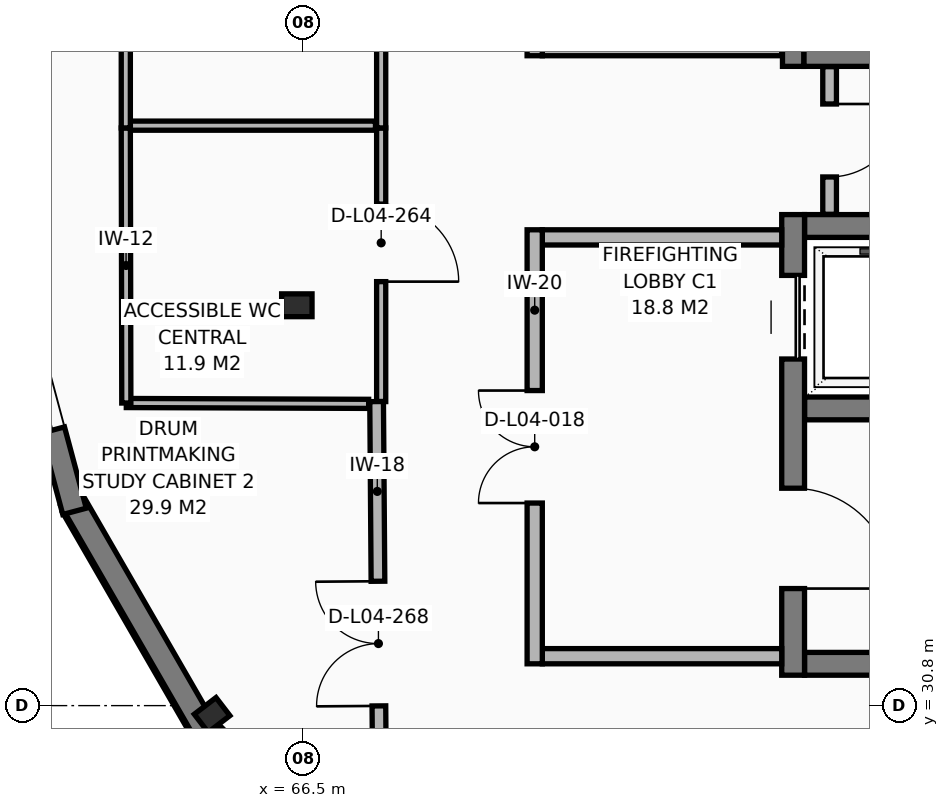
"""IFC4 building model, lengths in metres.
Left out: names, types, materials, properties, quantities, classifications, styles, units other than length and angle.
Written with IfcOpenShell. Run it as: python <this file> out.ifc"""

import sys

from ifc_helpers import new_model, si_unit, direction, frame, frame_2d, origin, origin_2d, place, context, subcontext, project, spatial, rectangle, i_section, extrude, element, fill, save


model = new_model("IFC4")
c1 = context("Model", 3, precision=1e-05, world=origin(), true_north=direction((0.0, 1.0)))
c2 = subcontext(c1, "Body", "Model", "MODEL_VIEW")
j1 = project(units=[si_unit("LENGTHUNIT", "METRE"), si_unit("PLANEANGLEUNIT", "RADIAN")], contexts=[c1])
p1 = place(None, origin())
s1 = spatial("IfcSite", under=j1, at=p1, CompositionType="ELEMENT")
p2 = place(p1, origin())
s2 = spatial("IfcBuilding", under=s1, at=p2, CompositionType="ELEMENT")
p3 = place(p2, frame((0.0, 0.0, 17.64)))
s3 = spatial("IfcBuildingStorey", under=s2, at=p3, CompositionType="ELEMENT", Elevation=17.64)
p4 = place(p3, frame((65.305, 30.677, 0.0), z_axis=(0.0, 0.0, 1.0), x_axis=(-0.793353340291, -0.608761429009, 0.0)))
e1 = element("IfcColumn", 1, at=p4, inside=s3, PredefinedType="COLUMN", context=c2, shape_type="SweptSolid", body=[
    extrude(i_section(OverallWidth=0.3, OverallDepth=0.36, WebThickness=0.012, FlangeThickness=0.022, FilletRadius=0.027, at=origin_2d()), origin(), (0.0, 0.0, 1.0), 3.96),
])
p5 = place(p3, frame((66.42, 36.067, 0.0), z_axis=(0.0, 0.0, 1.0), x_axis=(1.0, 0.0, 0.0)))
e2 = element("IfcColumn", 2, at=p5, inside=s3, PredefinedType="COLUMN", context=c2, shape_type="SweptSolid", body=[
    extrude(i_section(OverallWidth=0.3, OverallDepth=0.4, WebThickness=0.013, FlangeThickness=0.024, FilletRadius=0.027, at=origin_2d()), origin(), (0.0, 0.0, 1.0), 3.96),
])
p6 = place(p3, frame((67.676, 28.042, 0.0), z_axis=(0.0, 0.0, 1.0), x_axis=(-0.707072526286, 0.707141034428, 0.0)))
e3 = element("IfcWall", 3, at=p6, inside=s3, PredefinedType="SOLIDWALL", context=c2, shape_type="SweptSolid", body=[
    extrude(rectangle(XDim=3.564, YDim=0.32, at=frame_2d((1.782, 0.0))), origin(), (0.0, 0.0, 1.0), 3.74),
])
p7 = place(p6, frame((1.107, 0.0, 0.85)))
e4 = element("IfcOpeningElement", 4, at=p7, cuts=e3, PredefinedType="OPENING", context=c2, shape_type="SweptSolid", body=[
    extrude(rectangle(XDim=1.35, YDim=1.5, at=frame_2d((0.675, 0.75))), frame((0.0, 0.17, 0.0), z_axis=(0.0, -1.0, 0.0), x_axis=(1.0, 0.0, 0.0)), (0.0, 0.0, 1.0), 0.34),
])
p8 = place(p3, frame((65.236, 30.424, 0.0), z_axis=(0.0, 0.0, 1.0), x_axis=(-0.499926044331, 0.8660680979, 0.0)))
e5 = element("IfcWall", 5, at=p8, inside=s3, PredefinedType="SOLIDWALL", context=c2, shape_type="SweptSolid", body=[
    extrude(rectangle(XDim=3.564, YDim=0.32, at=frame_2d((1.782, 0.0))), origin(), (0.0, 0.0, 1.0), 3.74),
])
p9 = place(p3, frame((63.495, 33.356, 0.0), z_axis=(0.0, 0.0, 1.0), x_axis=(-0.258830827966, 0.965922669003, 0.0)))
e6 = element("IfcWall", 6, at=p9, inside=s3, PredefinedType="SOLIDWALL", context=c2, shape_type="SweptSolid", body=[
    extrude(rectangle(XDim=3.563, YDim=0.32, at=frame_2d((1.782, 0.0))), origin(), (0.0, 0.0, 1.0), 3.74),
])
p10 = place(p9, frame((1.107, 0.0, 0.85)))
e7 = element("IfcOpeningElement", 7, at=p10, cuts=e6, PredefinedType="OPENING", context=c2, shape_type="SweptSolid", body=[
    extrude(rectangle(XDim=1.35, YDim=1.5, at=frame_2d((0.675, 0.75))), frame((0.0, 0.17, 0.0), z_axis=(0.0, -1.0, 0.0), x_axis=(1.0, 0.0, 0.0)), (0.0, 0.0, 1.0), 0.34),
])
for number, where, z_axis, x_axis in (
    (8, (73.1, 31.35, 0.0), (0.0, 0.0, 1.0), (1.0, 0.0, 0.0)),
    (9, (80.8, 34.71, 0.0), (0.0, 0.0, 1.0), (-1.0, 0.0, 0.0)),
):
    element("IfcWall", number, at=place(p3, frame(where, z_axis=z_axis, x_axis=x_axis)), inside=s3, PredefinedType="SHEAR", context=c2, shape_type="SweptSolid", body=[
        extrude(rectangle(XDim=7.7, YDim=0.3, at=frame_2d((3.85, 0.0))), origin(), (0.0, 0.0, 1.0), 3.74),
    ])
p11 = place(p3, frame((76.3, 37.11, 0.0), z_axis=(0.0, 0.0, 1.0), x_axis=(-1.0, 0.0, 0.0)))
e10 = element("IfcWall", 10, at=p11, inside=s3, PredefinedType="SHEAR", context=c2, shape_type="SweptSolid", body=[
    extrude(rectangle(XDim=3.2, YDim=0.3, at=frame_2d((1.6, 0.0))), origin(), (0.0, 0.0, 1.0), 3.74),
])
p12 = place(p3, frame((72.95, 37.26, 0.0), z_axis=(0.0, 0.0, 1.0), x_axis=(0.0, -1.0, 0.0)))
e11 = element("IfcWall", 11, at=p12, inside=s3, PredefinedType="SHEAR", context=c2, shape_type="SweptSolid", body=[
    extrude(rectangle(XDim=6.06, YDim=0.3, at=frame_2d((3.03, 0.0))), origin(), (0.0, 0.0, 1.0), 3.74),
])
p13 = place(p12, frame((0.8, 0.0, 0.0)))
e12 = element("IfcOpeningElement", 12, at=p13, cuts=e11, PredefinedType="OPENING", context=c2, shape_type="SweptSolid", body=[
    extrude(rectangle(XDim=1.1, YDim=2.12, at=frame_2d((0.55, 1.06))), frame((0.0, 0.16, 0.0), z_axis=(0.0, -1.0, 0.0), x_axis=(1.0, 0.0, 0.0)), (0.0, 0.0, 1.0), 0.32),
])
p14 = place(p12, frame((3.6, 0.0, 0.0)))
e13 = element("IfcOpeningElement", 13, at=p14, cuts=e11, PredefinedType="OPENING", context=c2, shape_type="SweptSolid", body=[
    extrude(rectangle(XDim=1.32, YDim=2.12, at=frame_2d((0.66, 1.06))), frame((0.0, 0.16, 0.0), z_axis=(0.0, -1.0, 0.0), x_axis=(1.0, 0.0, 0.0)), (0.0, 0.0, 1.0), 0.32),
])
p15 = place(p3, frame((69.65, 31.45, 0.0), z_axis=(0.0, 0.0, 1.0), x_axis=(1.0, 0.0, 0.0)))
e14 = element("IfcWall", 14, at=p15, inside=s3, PredefinedType="PARTITIONING", context=c2, shape_type="SweptSolid", body=[
    extrude(rectangle(XDim=3.15, YDim=0.2, at=frame_2d((1.575, 0.0))), origin(), (0.0, 0.0, 1.0), 3.13),
])
p16 = place(p3, frame((72.8, 36.96, 0.0), z_axis=(0.0, 0.0, 1.0), x_axis=(-1.0, 0.0, 0.0)))
e15 = element("IfcWall", 15, at=p16, inside=s3, PredefinedType="PARTITIONING", context=c2, shape_type="SweptSolid", body=[
    extrude(rectangle(XDim=3.15, YDim=0.2, at=frame_2d((1.575, 0.0))), origin(), (0.0, 0.0, 1.0), 3.74),
])
p17 = place(p3, frame((69.55, 31.35, 0.0), z_axis=(0.0, 0.0, 1.0), x_axis=(0.0, 1.0, 0.0)))
e16 = element("IfcWall", 16, at=p17, inside=s3, PredefinedType="PARTITIONING", context=c2, shape_type="SweptSolid", body=[
    extrude(rectangle(XDim=5.71, YDim=0.2, at=frame_2d((2.855, 0.0))), origin(), (0.0, 0.0, 1.0), 3.13),
])
p18 = place(p17, frame((2.115, 0.0, 0.0)))
e17 = element("IfcOpeningElement", 17, at=p18, cuts=e16, PredefinedType="OPENING", context=c2, shape_type="SweptSolid", body=[
    extrude(rectangle(XDim=1.48, YDim=2.15, at=frame_2d((0.74, 1.075))), frame((0.0, 0.11, 0.0), z_axis=(0.0, -1.0, 0.0), x_axis=(1.0, 0.0, 0.0)), (0.0, 0.0, 1.0), 0.22),
])
p19 = place(p3, frame((73.09, 39.35, 0.0), z_axis=(0.0, 0.0, 1.0), x_axis=(1.0, 0.0, 0.0)))
e18 = element("IfcWall", 18, at=p19, inside=s3, PredefinedType="SHEAR", context=c2, shape_type="SweptSolid", body=[
    extrude(rectangle(XDim=7.7, YDim=0.28, at=frame_2d((3.85, 0.0))), origin(), (0.0, 0.0, 1.0), 3.74),
])
p20 = place(p3, frame((72.95, 45.25, 0.0), z_axis=(0.0, 0.0, 1.0), x_axis=(0.0, -1.0, 0.0)))
e19 = element("IfcWall", 19, at=p20, inside=s3, PredefinedType="SHEAR", context=c2, shape_type="SweptSolid", body=[
    extrude(rectangle(XDim=6.04, YDim=0.28, at=frame_2d((3.02, 0.0))), origin(), (0.0, 0.0, 1.0), 3.74),
])
p21 = place(p20, frame((0.8, 0.0, 0.0)))
e20 = element("IfcOpeningElement", 20, at=p21, cuts=e19, PredefinedType="OPENING", context=c2, shape_type="SweptSolid", body=[
    extrude(rectangle(XDim=1.1, YDim=2.12, at=frame_2d((0.55, 1.06))), frame((0.0, 0.15, 0.0), z_axis=(0.0, -1.0, 0.0), x_axis=(1.0, 0.0, 0.0)), (0.0, 0.0, 1.0), 0.3),
])
p22 = place(p20, frame((3.6, 0.0, 0.0)))
e21 = element("IfcOpeningElement", 21, at=p22, cuts=e19, PredefinedType="OPENING", context=c2, shape_type="SweptSolid", body=[
    extrude(rectangle(XDim=1.32, YDim=2.12, at=frame_2d((0.66, 1.06))), frame((0.0, 0.15, 0.0), z_axis=(0.0, -1.0, 0.0), x_axis=(1.0, 0.0, 0.0)), (0.0, 0.0, 1.0), 0.3),
])
p23 = place(p3, frame((69.65, 39.45, 0.0), z_axis=(0.0, 0.0, 1.0), x_axis=(1.0, 0.0, 0.0)))
e22 = element("IfcWall", 22, at=p23, inside=s3, PredefinedType="PARTITIONING", context=c2, shape_type="SweptSolid", body=[
    extrude(rectangle(XDim=3.15, YDim=0.2, at=frame_2d((1.575, 0.0))), origin(), (0.0, 0.0, 1.0), 3.74),
])
p24 = place(p3, frame((69.55, 39.35, 0.0), z_axis=(0.0, 0.0, 1.0), x_axis=(0.0, 1.0, 0.0)))
e23 = element("IfcWall", 23, at=p24, inside=s3, PredefinedType="PARTITIONING", context=c2, shape_type="SweptSolid", body=[
    extrude(rectangle(XDim=5.71, YDim=0.2, at=frame_2d((2.855, 0.0))), origin(), (0.0, 0.0, 1.0), 3.13),
])
p25 = place(p24, frame((2.115, 0.0, 0.0)))
e24 = element("IfcOpeningElement", 24, at=p25, cuts=e23, PredefinedType="OPENING", context=c2, shape_type="SweptSolid", body=[
    extrude(rectangle(XDim=1.48, YDim=2.15, at=frame_2d((0.74, 1.075))), frame((0.0, 0.11, 0.0), z_axis=(0.0, -1.0, 0.0), x_axis=(1.0, 0.0, 0.0)), (0.0, 0.0, 1.0), 0.22),
])
p26 = place(p3, frame((67.53, 38.4, 0.0), z_axis=(0.0, 0.0, 1.0), x_axis=(0.0, -1.0, 0.0)))
e25 = element("IfcWall", 25, at=p26, inside=s3, PredefinedType="PARTITIONING", context=c2, shape_type="SweptSolid", body=[
    extrude(rectangle(XDim=3.6, YDim=0.12, at=frame_2d((1.8, 0.0))), origin(), (0.0, 0.0, 1.0), 3.13),
])
p27 = place(p26, frame((1.002, 0.0, 0.0)))
e26 = element("IfcOpeningElement", 26, at=p27, cuts=e25, PredefinedType="OPENING", context=c2, shape_type="SweptSolid", body=[
    extrude(rectangle(XDim=1.02, YDim=2.12, at=frame_2d((0.51, 1.06))), frame((0.0, 0.07, 0.0), z_axis=(0.0, -1.0, 0.0), x_axis=(1.0, 0.0, 0.0)), (0.0, 0.0, 1.0), 0.14),
])
p28 = place(p3, frame((67.53, 42.0, 0.0), z_axis=(0.0, 0.0, 1.0), x_axis=(0.0, -1.0, 0.0)))
e27 = element("IfcWall", 27, at=p28, inside=s3, PredefinedType="PARTITIONING", context=c2, shape_type="SweptSolid", body=[
    extrude(rectangle(XDim=3.6, YDim=0.12, at=frame_2d((1.8, 0.0))), origin(), (0.0, 0.0, 1.0), 3.13),
])
p29 = place(p28, frame((1.32, 0.0, 0.0)))
e28 = element("IfcOpeningElement", 28, at=p29, cuts=e27, PredefinedType="OPENING", context=c2, shape_type="SweptSolid", body=[
    extrude(rectangle(XDim=0.96, YDim=2.1, at=frame_2d((0.48, 1.05))), frame((0.0, 0.07, 0.0), z_axis=(0.0, -1.0, 0.0), x_axis=(1.0, 0.0, 0.0)), (0.0, 0.0, 1.0), 0.14),
])
p30 = place(p3, frame((73.43, 39.206, 0.0), z_axis=(0.0, 0.0, 1.0), x_axis=(0.0, -1.0, 0.0)))
e29 = element("IfcWall", 29, at=p30, inside=s3, PredefinedType="PARTITIONING", context=c2, shape_type="SweptSolid", body=[
    extrude(rectangle(XDim=1.942, YDim=0.18, at=frame_2d((0.971, 0.0))), origin(), (0.0, 0.0, 1.0), 3.73),
])
p31 = place(p30, frame((0.491, 0.0, 0.0)))
e30 = element("IfcOpeningElement", 30, at=p31, cuts=e29, PredefinedType="OPENING", context=c2, shape_type="SweptSolid", body=[
    extrude(rectangle(XDim=0.96, YDim=2.1, at=frame_2d((0.48, 1.05))), frame((0.0, 0.1, 0.0), z_axis=(0.0, -1.0, 0.0), x_axis=(1.0, 0.0, 0.0)), (0.0, 0.0, 1.0), 0.2),
])
p32 = place(p3, frame((67.518, 28.433, 0.0), z_axis=(0.0, 0.0, 1.0), x_axis=(-0.007476498212, 0.999972050597, 0.0)))
e31 = element("IfcWall", 31, at=p32, inside=s3, PredefinedType="PARTITIONING", context=c2, shape_type="SweptSolid", body=[
    extrude(rectangle(XDim=6.368, YDim=0.18, at=frame_2d((3.184, 0.0))), origin(), (0.0, 0.0, 1.0), 3.13),
])
p33 = place(p32, frame((2.364, 0.0, 0.0)))
e32 = element("IfcOpeningElement", 32, at=p33, cuts=e31, PredefinedType="OPENING", context=c2, shape_type="SweptSolid", body=[
    extrude(rectangle(XDim=1.64, YDim=2.2, at=frame_2d((0.82, 1.1))), frame((0.0, 0.1, 0.0), z_axis=(0.0, -1.0, 0.0), x_axis=(1.0, 0.0, 0.0)), (0.0, 0.0, 1.0), 0.2),
])
p34 = place(p3, frame((64.2, 38.43, 0.0), z_axis=(0.0, 0.0, 1.0), x_axis=(1.0, 0.0, 0.0)))
e33 = element("IfcWall", 33, at=p34, inside=s3, PredefinedType="PARTITIONING", context=c2, shape_type="SweptSolid", body=[
    extrude(rectangle(XDim=3.255, YDim=0.12, at=frame_2d((1.627, 0.0))), origin(), (0.0, 0.0, 1.0), 3.13),
])
p35 = place(p3, frame((67.365, 34.77, 0.0), z_axis=(0.0, 0.0, 1.0), x_axis=(-0.999994063851, 0.003445615075, 0.0)))
e34 = element("IfcWall", 34, at=p35, inside=s3, PredefinedType="PARTITIONING", context=c2, shape_type="SweptSolid", body=[
    extrude(rectangle(XDim=3.188, YDim=0.12, at=frame_2d((1.594, 0.0))), origin(), (0.0, 0.0, 1.0), 3.13),
])
p36 = place(p3, frame((64.177, 34.781, 0.0), z_axis=(0.0, 0.0, 1.0), x_axis=(-0.001888952982, 0.999998215927, 0.0)))
e35 = element("IfcWall", 35, at=p36, inside=s3, PredefinedType="PARTITIONING", context=c2, shape_type="SweptSolid", body=[
    extrude(rectangle(XDim=3.619, YDim=0.12, at=frame_2d((1.81, 0.0))), origin(), (0.0, 0.0, 1.0), 3.28),
])
p37 = place(p3, frame((64.17, 38.4, 0.0), z_axis=(0.0, 0.0, 1.0), x_axis=(0.0, 1.0, 0.0)))
e36 = element("IfcWall", 36, at=p37, inside=s3, PredefinedType="PARTITIONING", context=c2, shape_type="SweptSolid", body=[
    extrude(rectangle(XDim=3.6, YDim=0.12, at=frame_2d((1.8, 0.0))), origin(), (0.0, 0.0, 1.0), 3.73),
])
p38 = place(p10, origin())
e37 = element("IfcWindow", 37, at=p38, inside=s3, PartitioningType="SINGLE_PANEL", PredefinedType="WINDOW", context=c2, shape_type="SweptSolid", body=[
    extrude(rectangle(XDim=1.35, YDim=1.5, at=frame_2d((0.675, 0.75))), frame((0.0, 0.03, 0.0), z_axis=(0.0, -1.0, 0.0), x_axis=(1.0, 0.0, 0.0)), (0.0, 0.0, 1.0), 0.06),
])
fill(e7, e37)
p39 = place(p13, origin())
e38 = element("IfcDoor", 38, at=p39, inside=s3, OperationType="SLIDING_TO_LEFT", PredefinedType="DOOR", context=c2, shape_type="SweptSolid", body=[
    extrude(rectangle(XDim=1.1, YDim=2.12, at=frame_2d((0.55, 1.06))), frame((0.0, 0.025, 0.0), z_axis=(0.0, -1.0, 0.0), x_axis=(1.0, 0.0, 0.0)), (0.0, 0.0, 1.0), 0.05),
])
fill(e12, e38)
p40 = place(p14, origin())
e39 = element("IfcDoor", 39, at=p40, inside=s3, OperationType="SINGLE_SWING_RIGHT", PredefinedType="DOOR", context=c2, shape_type="SweptSolid", body=[
    extrude(rectangle(XDim=1.32, YDim=2.12, at=frame_2d((0.66, 1.06))), frame((0.0, 0.025, 0.0), z_axis=(0.0, -1.0, 0.0), x_axis=(1.0, 0.0, 0.0)), (0.0, 0.0, 1.0), 0.05),
])
fill(e13, e39)
p41 = place(p18, origin())
e40 = element("IfcDoor", 40, at=p41, inside=s3, OperationType="DOUBLE_DOOR_SINGLE_SWING", PredefinedType="DOOR", context=c2, shape_type="SweptSolid", body=[
    extrude(rectangle(XDim=1.48, YDim=2.15, at=frame_2d((0.74, 1.075))), frame((0.0, 0.025, 0.0), z_axis=(0.0, -1.0, 0.0), x_axis=(1.0, 0.0, 0.0)), (0.0, 0.0, 1.0), 0.05),
])
fill(e17, e40)
p42 = place(p27, origin())
e41 = element("IfcDoor", 41, at=p42, inside=s3, OperationType="SINGLE_SWING_RIGHT", PredefinedType="DOOR", context=c2, shape_type="SweptSolid", body=[
    extrude(rectangle(XDim=1.02, YDim=2.12, at=frame_2d((0.51, 1.06))), frame((0.0, 0.025, 0.0), z_axis=(0.0, -1.0, 0.0), x_axis=(1.0, 0.0, 0.0)), (0.0, 0.0, 1.0), 0.05),
])
fill(e26, e41)
p43 = place(p31, origin())
e42 = element("IfcDoor", 42, at=p43, inside=s3, OperationType="SINGLE_SWING_LEFT", PredefinedType="DOOR", context=c2, shape_type="SweptSolid", body=[
    extrude(rectangle(XDim=0.96, YDim=2.1, at=frame_2d((0.48, 1.05))), frame((0.0, 0.025, 0.0), z_axis=(0.0, -1.0, 0.0), x_axis=(1.0, 0.0, 0.0)), (0.0, 0.0, 1.0), 0.05),
])
fill(e30, e42)
p44 = place(p33, origin())
e43 = element("IfcDoor", 43, at=p44, inside=s3, OperationType="DOUBLE_DOOR_SINGLE_SWING", PredefinedType="DOOR", context=c2, shape_type="SweptSolid", body=[
    extrude(rectangle(XDim=1.64, YDim=2.2, at=frame_2d((0.82, 1.1))), frame((0.0, 0.025, 0.0), z_axis=(0.0, -1.0, 0.0), x_axis=(1.0, 0.0, 0.0)), (0.0, 0.0, 1.0), 0.05),
])
fill(e32, e43)
save(model, sys.argv[1])
